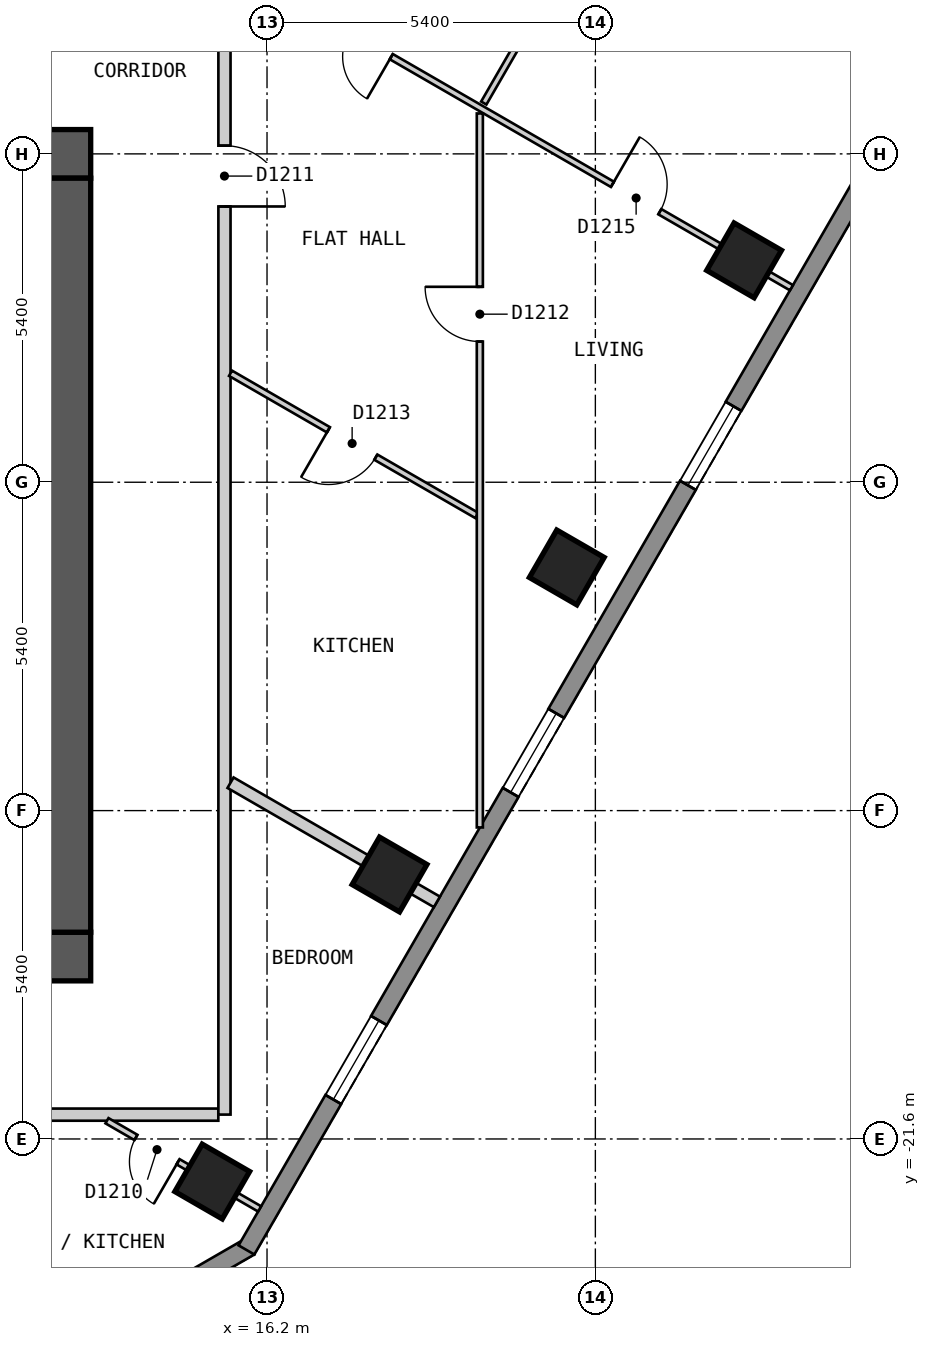
"""IFC4 building model, lengths in metres.
Left out: names, types, materials, properties, quantities, classifications, styles, units other than length and angle.
Written with IfcOpenShell. Run it as: python <this file> out.ifc"""

import sys

from ifc_helpers import new_model, si_unit, direction, frame, frame_2d, origin, origin_2d, place, context, subcontext, project, spatial, polyline, rectangle, outline, extrude, element, fill, save


model = new_model("IFC4")
c1 = context("Model", 3, precision=1e-05, world=origin(), true_north=direction((0.0, 1.0)))
c2 = subcontext(c1, "Body", "Model", "MODEL_VIEW")
j1 = project(units=[si_unit("LENGTHUNIT", "METRE"), si_unit("PLANEANGLEUNIT", "RADIAN")], contexts=[c1])
p1 = place(None, origin())
s1 = spatial("IfcSite", under=j1, at=p1, CompositionType="ELEMENT")
p2 = place(p1, origin())
s2 = spatial("IfcBuilding", under=s1, at=p2, CompositionType="ELEMENT")
p3 = place(p2, frame((0.0, 0.0, 117.6)))
s3 = spatial("IfcBuildingStorey", under=s2, at=p3, CompositionType="ELEMENT", Elevation=117.6)
for number, where, z_axis, x_axis in (
    (1, (15.299, -22.3, 0.0), (0.0, 0.0, 1.0), (0.5, 0.866, 0.0)),
    (2, (18.215, -17.251, 0.0), (0.0, 0.0, 1.0), (0.5, 0.866, 0.0)),
    (3, (21.13, -12.201, 0.0), (0.0, 0.0, 1.0), (0.5, 0.866, 0.0)),
    (4, (24.046, -7.151, 0.0), (0.0, 0.0, 1.0), (0.5, 0.866, 0.0)),
):
    element("IfcColumn", number, at=place(p3, frame(where, z_axis=z_axis, x_axis=x_axis)), inside=s3, PredefinedType="COLUMN", context=c2, shape_type="SweptSolid", body=[
        extrude(rectangle(XDim=0.9, YDim=0.9, at=origin_2d()), origin(), (0.0, 0.0, 1.0), 3.0),
    ])
p4 = place(p3, frame((-13.3, -18.6, 0.0), z_axis=(0.0, 0.0, 1.0), x_axis=(1.0, 0.0, 0.0)))
e5 = element("IfcWall", 5, at=p4, inside=s3, PredefinedType="SHEAR", context=c2, shape_type="SweptSolid", body=[
    extrude(rectangle(XDim=26.6, YDim=0.8, at=frame_2d((13.3, 0.0))), origin(), (0.0, 0.0, 1.0), 2.7),
])
p5 = place(p3, frame((-13.3, -5.4, 0.0), z_axis=(0.0, 0.0, 1.0), x_axis=(1.0, 0.0, 0.0)))
e6 = element("IfcWall", 6, at=p5, inside=s3, PredefinedType="SHEAR", context=c2, shape_type="SweptSolid", body=[
    extrude(rectangle(XDim=26.6, YDim=0.8, at=frame_2d((13.3, 0.0))), origin(), (0.0, 0.0, 1.0), 2.7),
])
p6 = place(p5, frame((23.65, 0.0, 0.0)))
e7 = element("IfcOpeningElement", 7, at=p6, cuts=e6, PredefinedType="OPENING", context=c2, shape_type="SweptSolid", body=[
    extrude(rectangle(XDim=1.2, YDim=2.1, at=frame_2d((0.6, 1.05))), frame((0.0, 0.41, 0.0), z_axis=(0.0, -1.0, 0.0), x_axis=(1.0, 0.0, 0.0)), (0.0, 0.0, 1.0), 0.82),
])
p7 = place(p3, frame((12.9, -18.2, 0.0), z_axis=(0.0, 0.0, 1.0), x_axis=(0.0, 1.0, 0.0)))
e8 = element("IfcWall", 8, at=p7, inside=s3, PredefinedType="SHEAR", context=c2, shape_type="SweptSolid", body=[
    extrude(rectangle(XDim=12.4, YDim=0.8, at=frame_2d((6.2, 0.0))), origin(), (0.0, 0.0, 1.0), 2.7),
])
p8 = place(p3, frame((11.587, -25.87, 0.0), z_axis=(0.0, 0.0, 1.0), x_axis=(0.866022959057, 0.500004234368, 0.0)))
e9 = element("IfcWall", 9, at=p8, inside=s3, PredefinedType="SOLIDWALL", context=c2, shape_type="SweptSolid", body=[
    extrude(outline(polyline([(0.0, -0.15), (5.0, -0.15), (4.92, 0.15), (0.08, 0.15), (0.0, -0.15)])), origin(), (0.0, 0.0, 1.0), 2.7),
])
p9 = place(p8, frame((0.65, 0.0, 0.15)))
e10 = element("IfcOpeningElement", 10, at=p9, cuts=e9, PredefinedType="OPENING", context=c2, shape_type="SweptSolid", body=[
    extrude(rectangle(XDim=1.2, YDim=2.1, at=frame_2d((0.6, 1.05))), frame((0.0, 0.16, 0.0), z_axis=(0.0, -1.0, 0.0), x_axis=(1.0, 0.0, 0.0)), (0.0, 0.0, 1.0), 0.32),
])
p10 = place(p3, frame((15.862, -23.425, 0.0), z_axis=(0.0, 0.0, 1.0), x_axis=(0.500017503135, 0.866015298109, 0.0)))
e11 = element("IfcWall", 11, at=p10, inside=s3, PredefinedType="SOLIDWALL", context=c2, shape_type="SweptSolid", body=[
    extrude(outline(polyline([(0.0, -0.15), (24.711, -0.15), (24.631, 0.15), (0.08, 0.15), (0.0, -0.15)])), origin(), (0.0, 0.0, 1.0), 2.7),
])
p11 = place(p10, frame((2.857, 0.0, 0.15)))
e12 = element("IfcOpeningElement", 12, at=p11, cuts=e11, PredefinedType="OPENING", context=c2, shape_type="SweptSolid", body=[
    extrude(rectangle(XDim=1.5, YDim=2.1, at=frame_2d((0.75, 1.05))), frame((0.0, 0.16, 0.0), z_axis=(0.0, -1.0, 0.0), x_axis=(1.0, 0.0, 0.0)), (0.0, 0.0, 1.0), 0.32),
])
p12 = place(p10, frame((8.689, 0.0, 0.15)))
e13 = element("IfcOpeningElement", 13, at=p12, cuts=e11, PredefinedType="OPENING", context=c2, shape_type="SweptSolid", body=[
    extrude(rectangle(XDim=1.5, YDim=2.1, at=frame_2d((0.75, 1.05))), frame((0.0, 0.16, 0.0), z_axis=(0.0, -1.0, 0.0), x_axis=(1.0, 0.0, 0.0)), (0.0, 0.0, 1.0), 0.32),
])
p13 = place(p10, frame((14.52, 0.0, 0.15)))
e14 = element("IfcOpeningElement", 14, at=p13, cuts=e11, PredefinedType="OPENING", context=c2, shape_type="SweptSolid", body=[
    extrude(rectangle(XDim=1.5, YDim=2.1, at=frame_2d((0.75, 1.05))), frame((0.0, 0.16, 0.0), z_axis=(0.0, -1.0, 0.0), x_axis=(1.0, 0.0, 0.0)), (0.0, 0.0, 1.0), 0.32),
])
p14 = place(p10, frame((20.351, 0.0, 0.15)))
e15 = element("IfcOpeningElement", 15, at=p14, cuts=e11, PredefinedType="OPENING", context=c2, shape_type="SweptSolid", body=[
    extrude(rectangle(XDim=1.5, YDim=2.1, at=frame_2d((0.75, 1.05))), frame((0.0, 0.16, 0.0), z_axis=(0.0, -1.0, 0.0), x_axis=(1.0, 0.0, 0.0)), (0.0, 0.0, 1.0), 0.32),
])
p15 = place(p3, frame((-15.499, -21.2, 0.0), z_axis=(0.0, 0.0, 1.0), x_axis=(1.0, 0.0, 0.0)))
e16 = element("IfcWall", 16, at=p15, inside=s3, PredefinedType="PARTITIONING", context=c2, shape_type="SweptSolid", body=[
    extrude(rectangle(XDim=30.898, YDim=0.2, at=frame_2d((15.449, 0.0))), origin(), (0.0, 0.0, 1.0), 2.7),
])
p16 = place(p15, frame((12.258, 0.0, 0.0)))
e17 = element("IfcOpeningElement", 17, at=p16, cuts=e16, PredefinedType="OPENING", context=c2, shape_type="SweptSolid", body=[
    extrude(rectangle(XDim=1.0, YDim=2.1, at=frame_2d((0.5, 1.05))), frame((0.0, 0.11, 0.0), z_axis=(0.0, -1.0, 0.0), x_axis=(1.0, 0.0, 0.0)), (0.0, 0.0, 1.0), 0.22),
])
p17 = place(p15, frame((23.228, 0.0, 0.0)))
e18 = element("IfcOpeningElement", 18, at=p17, cuts=e16, PredefinedType="OPENING", context=c2, shape_type="SweptSolid", body=[
    extrude(rectangle(XDim=1.0, YDim=2.1, at=frame_2d((0.5, 1.05))), frame((0.0, 0.11, 0.0), z_axis=(0.0, -1.0, 0.0), x_axis=(1.0, 0.0, 0.0)), (0.0, 0.0, 1.0), 0.22),
])
p18 = place(p3, frame((15.5, -21.199, 0.0), z_axis=(0.0, 0.0, 1.0), x_axis=(0.0, 1.0, 0.0)))
e19 = element("IfcWall", 19, at=p18, inside=s3, PredefinedType="PARTITIONING", context=c2, shape_type="SweptSolid", body=[
    extrude(rectangle(XDim=17.647, YDim=0.2, at=frame_2d((8.823, 0.0))), origin(), (0.0, 0.0, 1.0), 2.7),
])
p19 = place(p18, frame((14.934, 0.0, 0.0)))
e20 = element("IfcOpeningElement", 20, at=p19, cuts=e19, PredefinedType="OPENING", context=c2, shape_type="SweptSolid", body=[
    extrude(rectangle(XDim=1.0, YDim=2.1, at=frame_2d((0.5, 1.05))), frame((0.0, 0.11, 0.0), z_axis=(0.0, -1.0, 0.0), x_axis=(1.0, 0.0, 0.0)), (0.0, 0.0, 1.0), 0.22),
])
p20 = place(p3, frame((13.568, -21.3, 0.0), z_axis=(0.0, 0.0, 1.0), x_axis=(0.865885342641, -0.500242514586, 0.0)))
e21 = element("IfcWall", 21, at=p20, inside=s3, PredefinedType="PARTITIONING", context=c2, shape_type="SweptSolid", body=[
    extrude(rectangle(XDim=2.898, YDim=0.1, at=frame_2d((1.449, 0.0))), origin(), (0.0, 0.0, 1.0), 2.7),
])
p21 = place(p20, frame((0.55, 0.0, 0.0)))
e22 = element("IfcOpeningElement", 22, at=p21, cuts=e21, PredefinedType="OPENING", context=c2, shape_type="SweptSolid", body=[
    extrude(rectangle(XDim=0.8, YDim=2.1, at=frame_2d((0.4, 1.05))), frame((0.0, 0.06, 0.0), z_axis=(0.0, -1.0, 0.0), x_axis=(1.0, 0.0, 0.0)), (0.0, 0.0, 1.0), 0.12),
])
p22 = place(p3, frame((15.6, -9.008, 0.0), z_axis=(0.0, 0.0, 1.0), x_axis=(0.866049960314, -0.49995746443, 0.0)))
e23 = element("IfcWall", 23, at=p22, inside=s3, PredefinedType="PARTITIONING", context=c2, shape_type="SweptSolid", body=[
    extrude(rectangle(XDim=4.676, YDim=0.1, at=frame_2d((2.338, 0.0))), origin(), (0.0, 0.0, 1.0), 2.7),
])
p23 = place(p22, frame((1.859, 0.0, 0.0)))
e24 = element("IfcOpeningElement", 24, at=p23, cuts=e23, PredefinedType="OPENING", context=c2, shape_type="SweptSolid", body=[
    extrude(rectangle(XDim=0.9, YDim=2.1, at=frame_2d((0.45, 1.05))), frame((0.0, 0.06, 0.0), z_axis=(0.0, -1.0, 0.0), x_axis=(1.0, 0.0, 0.0)), (0.0, 0.0, 1.0), 0.12),
])
p24 = place(p3, frame((16.165, -2.601, 0.0), z_axis=(0.0, 0.0, 1.0), x_axis=(0.866016855193, -0.500014806302, 0.0)))
e25 = element("IfcWall", 25, at=p24, inside=s3, PredefinedType="PARTITIONING", context=c2, shape_type="SweptSolid", body=[
    extrude(rectangle(XDim=10.0, YDim=0.1, at=frame_2d((5.0, 0.0))), origin(), (0.0, 0.0, 1.0), 2.7),
])
p25 = place(p24, frame((1.6, 0.0, 0.0)))
e26 = element("IfcOpeningElement", 26, at=p25, cuts=e25, PredefinedType="OPENING", context=c2, shape_type="SweptSolid", body=[
    extrude(rectangle(XDim=0.8, YDim=2.1, at=frame_2d((0.4, 1.05))), frame((0.0, 0.06, 0.0), z_axis=(0.0, -1.0, 0.0), x_axis=(1.0, 0.0, 0.0)), (0.0, 0.0, 1.0), 0.12),
])
p26 = place(p24, frame((6.6, 0.0, 0.0)))
e27 = element("IfcOpeningElement", 27, at=p26, cuts=e25, PredefinedType="OPENING", context=c2, shape_type="SweptSolid", body=[
    extrude(rectangle(XDim=0.9, YDim=2.1, at=frame_2d((0.45, 1.05))), frame((0.0, 0.06, 0.0), z_axis=(0.0, -1.0, 0.0), x_axis=(1.0, 0.0, 0.0)), (0.0, 0.0, 1.0), 0.12),
])
p27 = place(p3, frame((19.765, -4.564, 0.0), z_axis=(0.0, 0.0, 1.0), x_axis=(0.500060182325, 0.865990654714, 0.0)))
e28 = element("IfcWall", 28, at=p27, inside=s3, PredefinedType="PARTITIONING", context=c2, shape_type="SweptSolid", body=[
    extrude(rectangle(XDim=5.632, YDim=0.1, at=frame_2d((2.816, 0.0))), origin(), (0.0, 0.0, 1.0), 2.7),
])
p28 = place(p3, frame((19.7, -16.477, 0.0), z_axis=(0.0, 0.0, 1.0), x_axis=(0.0, 1.0, 0.0)))
e29 = element("IfcWall", 29, at=p28, inside=s3, PredefinedType="PARTITIONING", context=c2, shape_type="SweptSolid", body=[
    extrude(rectangle(XDim=11.742, YDim=0.1, at=frame_2d((5.871, 0.0))), origin(), (0.0, 0.0, 1.0), 2.7),
])
p29 = place(p28, frame((7.991, 0.0, 0.0)))
e30 = element("IfcOpeningElement", 30, at=p29, cuts=e29, PredefinedType="OPENING", context=c2, shape_type="SweptSolid", body=[
    extrude(rectangle(XDim=0.9, YDim=2.1, at=frame_2d((0.45, 1.05))), frame((0.0, 0.06, 0.0), z_axis=(0.0, -1.0, 0.0), x_axis=(1.0, 0.0, 0.0)), (0.0, 0.0, 1.0), 0.12),
])
p30 = place(p3, frame((15.6, -15.741, 0.0), z_axis=(0.0, 0.0, 1.0), x_axis=(0.865964599155, -0.500105301922, 0.0)))
e31 = element("IfcWall", 31, at=p30, inside=s3, PredefinedType="PARTITIONING", context=c2, shape_type="SweptSolid", body=[
    extrude(rectangle(XDim=3.919, YDim=0.2, at=frame_2d((1.959, 0.0))), origin(), (0.0, 0.0, 1.0), 2.7),
])
p31 = place(p11, origin())
e32 = element("IfcWindow", 32, at=p31, inside=s3, PartitioningType="SINGLE_PANEL", PredefinedType="WINDOW", context=c2, shape_type="SweptSolid", body=[
    extrude(rectangle(XDim=1.5, YDim=2.1, at=frame_2d((0.75, 1.05))), frame((0.0, 0.03, 0.0), z_axis=(0.0, -1.0, 0.0), x_axis=(1.0, 0.0, 0.0)), (0.0, 0.0, 1.0), 0.06),
])
fill(e12, e32)
p32 = place(p12, origin())
e33 = element("IfcWindow", 33, at=p32, inside=s3, PartitioningType="SINGLE_PANEL", PredefinedType="WINDOW", context=c2, shape_type="SweptSolid", body=[
    extrude(rectangle(XDim=1.5, YDim=2.1, at=frame_2d((0.75, 1.05))), frame((0.0, 0.03, 0.0), z_axis=(0.0, -1.0, 0.0), x_axis=(1.0, 0.0, 0.0)), (0.0, 0.0, 1.0), 0.06),
])
fill(e13, e33)
p33 = place(p13, origin())
e34 = element("IfcWindow", 34, at=p33, inside=s3, PartitioningType="SINGLE_PANEL", PredefinedType="WINDOW", context=c2, shape_type="SweptSolid", body=[
    extrude(rectangle(XDim=1.5, YDim=2.1, at=frame_2d((0.75, 1.05))), frame((0.0, 0.03, 0.0), z_axis=(0.0, -1.0, 0.0), x_axis=(1.0, 0.0, 0.0)), (0.0, 0.0, 1.0), 0.06),
])
fill(e14, e34)
p34 = place(p21, origin())
e35 = element("IfcDoor", 35, at=p34, inside=s3, OperationType="SINGLE_SWING_RIGHT", PredefinedType="DOOR", context=c2, shape_type="SweptSolid", body=[
    extrude(rectangle(XDim=0.8, YDim=2.1, at=frame_2d((0.4, 1.05))), frame((0.0, 0.025, 0.0), z_axis=(0.0, -1.0, 0.0), x_axis=(1.0, 0.0, 0.0)), (0.0, 0.0, 1.0), 0.05),
])
fill(e22, e35)
p35 = place(p19, origin())
e36 = element("IfcDoor", 36, at=p35, inside=s3, OperationType="SINGLE_SWING_LEFT", PredefinedType="DOOR", context=c2, shape_type="SweptSolid", body=[
    extrude(rectangle(XDim=1.0, YDim=2.1, at=frame_2d((0.5, 1.05))), frame((0.0, 0.025, 0.0), z_axis=(0.0, -1.0, 0.0), x_axis=(1.0, 0.0, 0.0)), (0.0, 0.0, 1.0), 0.05),
])
fill(e20, e36)
p36 = place(p29, origin())
e37 = element("IfcDoor", 37, at=p36, inside=s3, OperationType="SINGLE_SWING_RIGHT", PredefinedType="DOOR", context=c2, shape_type="SweptSolid", body=[
    extrude(rectangle(XDim=0.9, YDim=2.1, at=frame_2d((0.45, 1.05))), frame((0.0, 0.025, 0.0), z_axis=(0.0, -1.0, 0.0), x_axis=(1.0, 0.0, 0.0)), (0.0, 0.0, 1.0), 0.05),
])
fill(e30, e37)
p37 = place(p23, origin())
e38 = element("IfcDoor", 38, at=p37, inside=s3, OperationType="SINGLE_SWING_LEFT", PredefinedType="DOOR", context=c2, shape_type="SweptSolid", body=[
    extrude(rectangle(XDim=0.9, YDim=2.1, at=frame_2d((0.45, 1.05))), frame((0.0, 0.025, 0.0), z_axis=(0.0, -1.0, 0.0), x_axis=(1.0, 0.0, 0.0)), (0.0, 0.0, 1.0), 0.05),
])
fill(e24, e38)
p38 = place(p25, origin())
e39 = element("IfcDoor", 39, at=p38, inside=s3, OperationType="SINGLE_SWING_RIGHT", PredefinedType="DOOR", context=c2, shape_type="SweptSolid", body=[
    extrude(rectangle(XDim=0.8, YDim=2.1, at=frame_2d((0.4, 1.05))), frame((0.0, 0.025, 0.0), z_axis=(0.0, -1.0, 0.0), x_axis=(1.0, 0.0, 0.0)), (0.0, 0.0, 1.0), 0.05),
])
fill(e26, e39)
p39 = place(p26, origin())
e40 = element("IfcDoor", 40, at=p39, inside=s3, OperationType="SINGLE_SWING_LEFT", PredefinedType="DOOR", context=c2, shape_type="SweptSolid", body=[
    extrude(rectangle(XDim=0.9, YDim=2.1, at=frame_2d((0.45, 1.05))), frame((0.0, 0.025, 0.0), z_axis=(0.0, -1.0, 0.0), x_axis=(1.0, 0.0, 0.0)), (0.0, 0.0, 1.0), 0.05),
])
fill(e27, e40)
save(model, sys.argv[1])
